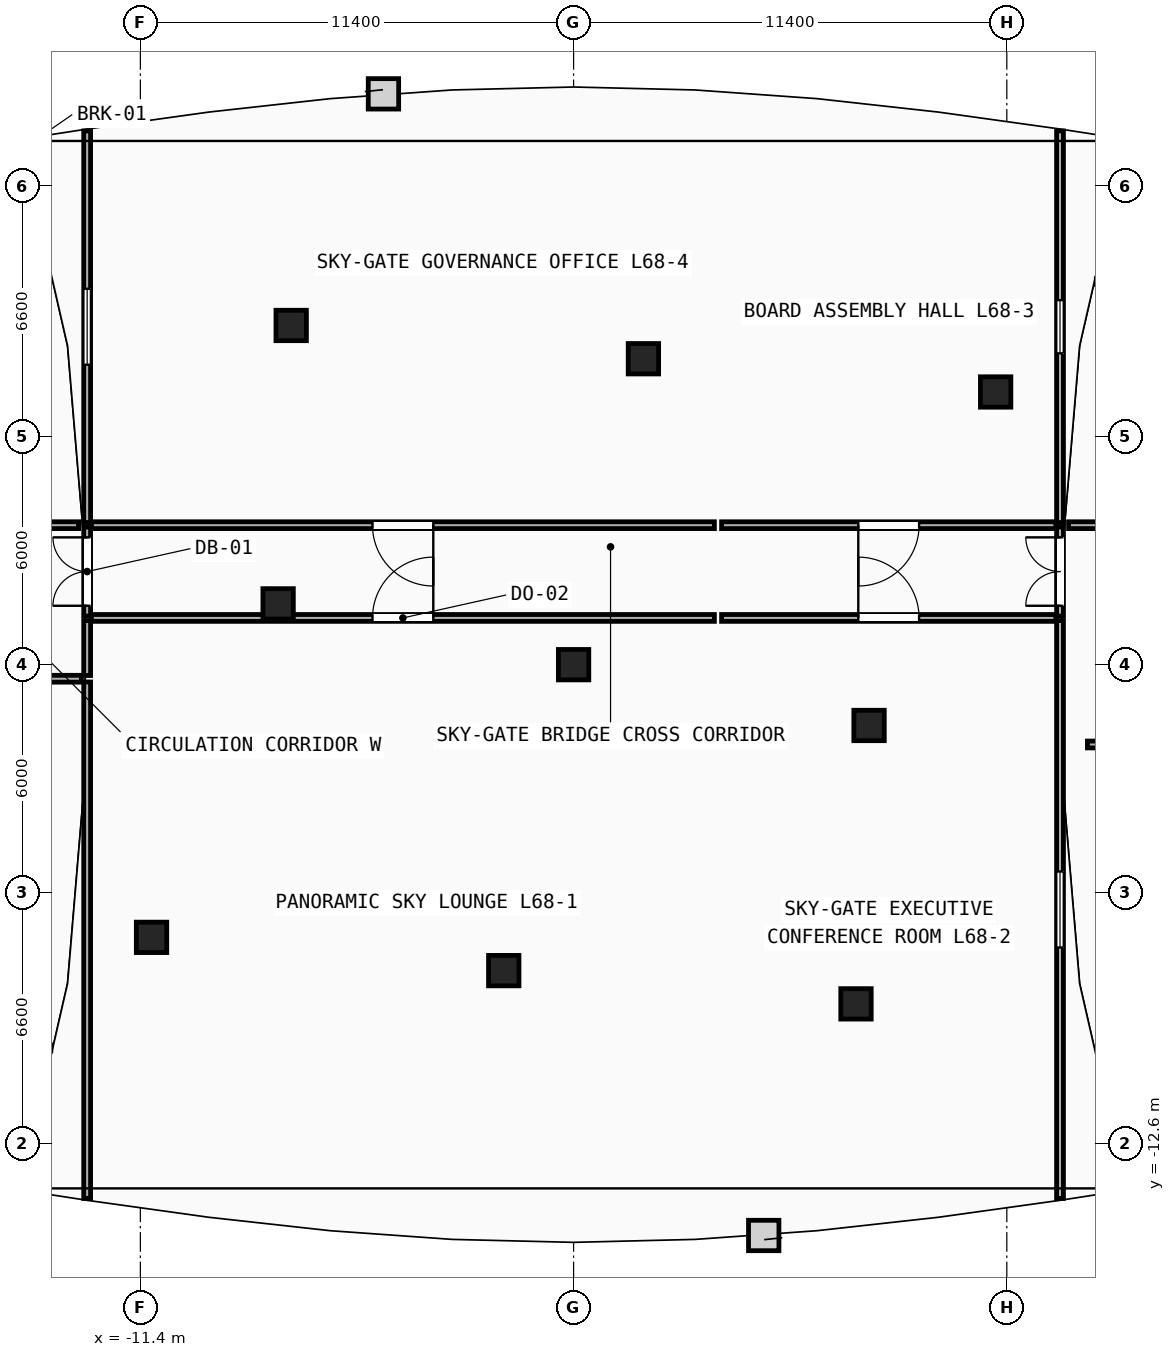
"""IFC4 building model, lengths in metres.
Left out: names, types, materials, properties, quantities, classifications, styles, units other than length and angle.
Written with IfcOpenShell. Run it as: python <this file> out.ifc"""

import sys

from ifc_helpers import new_model, si_unit, direction, frame, frame_2d, origin, origin_2d, place, context, subcontext, project, spatial, rectangle, extrude, element, fill, save


model = new_model("IFC4")
c1 = context("Model", 3, precision=1e-05, world=origin(), true_north=direction((0.0, 1.0)))
c2 = subcontext(c1, "Body", "Model", "MODEL_VIEW")
j1 = project(units=[si_unit("LENGTHUNIT", "METRE"), si_unit("PLANEANGLEUNIT", "RADIAN")], contexts=[c1])
p1 = place(None, origin())
s1 = spatial("IfcSite", under=j1, at=p1, CompositionType="ELEMENT")
p2 = place(p1, origin())
s2 = spatial("IfcBuilding", under=s1, at=p2, CompositionType="ELEMENT")
p3 = place(p2, frame((0.0, 0.0, 257.6)))
s3 = spatial("IfcBuildingStorey", under=s2, at=p3, CompositionType="ELEMENT", Elevation=257.6)
for number, where, z_axis, x_axis in (
    (1, (-11.106, -7.175, 0.0), (0.0, 0.0, 1.0), (1.0, 0.0, 0.0)),
    (2, (-1.837, -8.05, 0.0), (0.0, 0.0, 1.0), (1.0, 0.0, 0.0)),
    (3, (7.431, -8.925, 0.0), (0.0, 0.0, 1.0), (1.0, 0.0, 0.0)),
    (4, (-7.775, 1.6, 0.0), (0.0, 0.0, 1.0), (1.0, 0.0, 0.0)),
    (5, (0.0, 0.0, 0.0), (0.0, 0.0, 1.0), (1.0, 0.0, 0.0)),
    (6, (7.775, -1.6, 0.0), (0.0, 0.0, 1.0), (1.0, 0.0, 0.0)),
    (7, (-7.431, 8.925, 0.0), (0.0, 0.0, 1.0), (1.0, 0.0, 0.0)),
    (8, (1.837, 8.05, 0.0), (0.0, 0.0, 1.0), (1.0, 0.0, 0.0)),
    (9, (11.106, 7.175, 0.0), (0.0, 0.0, 1.0), (1.0, 0.0, 0.0)),
):
    element("IfcColumn", number, at=place(p3, frame(where, z_axis=z_axis, x_axis=x_axis)), inside=s3, PredefinedType="COLUMN", context=c2, shape_type="SweptSolid", body=[
        extrude(rectangle(XDim=0.8, YDim=0.8, at=origin_2d()), origin(), (0.0, 0.0, 1.0), 3.6),
    ])
p4 = place(p3, frame((-28.3, -0.37, 0.0), z_axis=(0.0, 0.0, 1.0), x_axis=(1.0, 0.0, 0.0)))
e10 = element("IfcWall", 10, at=p4, inside=s3, PredefinedType="PARTITIONING", context=c2, shape_type="SweptSolid", body=[
    extrude(rectangle(XDim=15.349, YDim=0.18, at=frame_2d((7.675, 0.0))), origin(), (0.0, 0.0, 1.0), 3.34),
])
p5 = place(p4, frame((7.175, 0.0, 0.0)))
e11 = element("IfcOpeningElement", 11, at=p5, cuts=e10, PredefinedType="OPENING", context=c2, shape_type="SweptSolid", body=[
    extrude(rectangle(XDim=1.0, YDim=2.15, at=frame_2d((0.5, 1.075))), frame((0.0, 0.1, 0.0), z_axis=(0.0, -1.0, 0.0), x_axis=(1.0, 0.0, 0.0)), (0.0, 0.0, 1.0), 0.2),
])
p6 = place(p3, frame((-13.026, 3.67, 0.0), z_axis=(0.0, 0.0, 1.0), x_axis=(-1.0, 0.0, 0.0)))
e12 = element("IfcWall", 12, at=p6, inside=s3, PredefinedType="PARTITIONING", context=c2, shape_type="SweptSolid", body=[
    extrude(rectangle(XDim=3.753, YDim=0.18, at=frame_2d((1.876, 0.0))), origin(), (0.0, 0.0, 1.0), 3.34),
])
p7 = place(p3, frame((13.521, -2.1, 0.0), z_axis=(0.0, 0.0, 1.0), x_axis=(1.0, 0.0, 0.0)))
e13 = element("IfcWall", 13, at=p7, inside=s3, PredefinedType="PARTITIONING", context=c2, shape_type="SweptSolid", body=[
    extrude(rectangle(XDim=7.398, YDim=0.18, at=frame_2d((3.699, 0.0))), origin(), (0.0, 0.0, 1.0), 3.34),
])
p8 = place(p3, frame((16.779, 3.67, 0.0), z_axis=(0.0, 0.0, 1.0), x_axis=(-1.0, 0.0, 0.0)))
e14 = element("IfcWall", 14, at=p8, inside=s3, PredefinedType="PARTITIONING", context=c2, shape_type="SweptSolid", body=[
    extrude(rectangle(XDim=3.753, YDim=0.18, at=frame_2d((1.876, 0.0))), origin(), (0.0, 0.0, 1.0), 3.34),
])
p9 = place(p3, frame((-12.688, 1.23, 0.0), z_axis=(0.0, 0.0, 1.0), x_axis=(1.0, 0.0, 0.0)))
e15 = element("IfcWall", 15, at=p9, inside=s3, PredefinedType="PARTITIONING", context=c2, shape_type="SweptSolid", body=[
    extrude(rectangle(XDim=16.394, YDim=0.18, at=frame_2d((8.197, 0.0))), origin(), (0.0, 0.0, 1.0), 2.663),
])
p10 = place(p9, frame((7.397, 0.0, 0.0)))
e16 = element("IfcOpeningElement", 16, at=p10, cuts=e15, PredefinedType="OPENING", context=c2, shape_type="SweptSolid", body=[
    extrude(rectangle(XDim=1.6, YDim=2.2, at=frame_2d((0.8, 1.1))), frame((0.0, 0.1, 0.0), z_axis=(0.0, -1.0, 0.0), x_axis=(1.0, 0.0, 0.0)), (0.0, 0.0, 1.0), 0.2),
])
p11 = place(p3, frame((3.895, 1.23, 0.0), z_axis=(0.0, 0.0, 1.0), x_axis=(1.0, 0.0, 0.0)))
e17 = element("IfcWall", 17, at=p11, inside=s3, PredefinedType="PARTITIONING", context=c2, shape_type="SweptSolid", body=[
    extrude(rectangle(XDim=8.793, YDim=0.18, at=frame_2d((4.397, 0.0))), origin(), (0.0, 0.0, 1.0), 3.34),
])
p12 = place(p11, frame((3.597, 0.0, 0.0)))
e18 = element("IfcOpeningElement", 18, at=p12, cuts=e17, PredefinedType="OPENING", context=c2, shape_type="SweptSolid", body=[
    extrude(rectangle(XDim=1.6, YDim=2.2, at=frame_2d((0.8, 1.1))), frame((0.0, 0.1, 0.0), z_axis=(0.0, -1.0, 0.0), x_axis=(1.0, 0.0, 0.0)), (0.0, 0.0, 1.0), 0.2),
])
p13 = place(p3, frame((12.688, 3.67, 0.0), z_axis=(0.0, 0.0, 1.0), x_axis=(-1.0, 0.0, 0.0)))
e19 = element("IfcWall", 19, at=p13, inside=s3, PredefinedType="PARTITIONING", context=c2, shape_type="SweptSolid", body=[
    extrude(rectangle(XDim=8.793, YDim=0.18, at=frame_2d((4.397, 0.0))), origin(), (0.0, 0.0, 1.0), 3.34),
])
p14 = place(p13, frame((3.597, 0.0, 0.0)))
e20 = element("IfcOpeningElement", 20, at=p14, cuts=e19, PredefinedType="OPENING", context=c2, shape_type="SweptSolid", body=[
    extrude(rectangle(XDim=1.6, YDim=2.2, at=frame_2d((0.8, 1.1))), frame((0.0, 0.1, 0.0), z_axis=(0.0, -1.0, 0.0), x_axis=(1.0, 0.0, 0.0)), (0.0, 0.0, 1.0), 0.2),
])
p15 = place(p3, frame((3.705, 3.67, 0.0), z_axis=(0.0, 0.0, 1.0), x_axis=(-1.0, 0.0, 0.0)))
e21 = element("IfcWall", 21, at=p15, inside=s3, PredefinedType="PARTITIONING", context=c2, shape_type="SweptSolid", body=[
    extrude(rectangle(XDim=16.394, YDim=0.18, at=frame_2d((8.197, 0.0))), origin(), (0.0, 0.0, 1.0), 3.34),
])
p16 = place(p15, frame((7.397, 0.0, 0.0)))
e22 = element("IfcOpeningElement", 22, at=p16, cuts=e21, PredefinedType="OPENING", context=c2, shape_type="SweptSolid", body=[
    extrude(rectangle(XDim=1.6, YDim=2.2, at=frame_2d((0.8, 1.1))), frame((0.0, 0.1, 0.0), z_axis=(0.0, -1.0, 0.0), x_axis=(1.0, 0.0, 0.0)), (0.0, 0.0, 1.0), 0.2),
])
p17 = place(p3, frame((-12.8, -14.044, 0.0), z_axis=(0.0, 0.0, 1.0), x_axis=(0.0, 1.0, 0.0)))
e23 = element("IfcWall", 23, at=p17, inside=s3, PredefinedType="PARTITIONING", context=c2, shape_type="SweptSolid", body=[
    extrude(rectangle(XDim=13.589, YDim=0.18, at=frame_2d((6.794, 0.0))), origin(), (0.0, 0.0, 1.0), 3.34),
])
p18 = place(p3, frame((-12.8, -0.285, 0.0), z_axis=(0.0, 0.0, 1.0), x_axis=(0.0, 1.0, 0.0)))
e24 = element("IfcWall", 24, at=p18, inside=s3, PredefinedType="PARTITIONING", context=c2, shape_type="SweptSolid", body=[
    extrude(rectangle(XDim=1.445, YDim=0.18, at=frame_2d((0.722, 0.0))), origin(), (0.0, 0.0, 1.0), 3.34),
])
p19 = place(p3, frame((-12.8, 3.74, 0.0), z_axis=(0.0, 0.0, 1.0), x_axis=(0.0, 1.0, 0.0)))
e25 = element("IfcWall", 25, at=p19, inside=s3, PredefinedType="PARTITIONING", context=c2, shape_type="SweptSolid", body=[
    extrude(rectangle(XDim=10.304, YDim=0.18, at=frame_2d((5.152, 0.0))), origin(), (0.0, 0.0, 1.0), 3.34),
])
p20 = place(p19, frame((4.152, 0.0, 1.05)))
e26 = element("IfcOpeningElement", 26, at=p20, cuts=e25, PredefinedType="OPENING", context=c2, shape_type="SweptSolid", body=[
    extrude(rectangle(XDim=2.0, YDim=1.5, at=frame_2d((1.0, 0.75))), frame((0.0, 0.1, 0.0), z_axis=(0.0, -1.0, 0.0), x_axis=(1.0, 0.0, 0.0)), (0.0, 0.0, 1.0), 0.2),
])
p21 = place(p3, frame((-12.8, 1.28, 0.0), z_axis=(0.0, 0.0, 1.0), x_axis=(0.0, 1.0, 0.0)))
e27 = element("IfcWall", 27, at=p21, inside=s3, PredefinedType="PARTITIONING", context=c2, shape_type="SweptSolid", body=[
    extrude(rectangle(XDim=2.34, YDim=0.18, at=frame_2d((1.17, 0.0))), origin(), (0.0, 0.0, 1.0), 3.34),
])
p22 = place(p21, frame((0.27, 0.0, 0.0)))
e28 = element("IfcOpeningElement", 28, at=p22, cuts=e27, PredefinedType="OPENING", context=c2, shape_type="SweptSolid", body=[
    extrude(rectangle(XDim=1.8, YDim=2.25, at=frame_2d((0.9, 1.125))), frame((0.0, 0.1, 0.0), z_axis=(0.0, -1.0, 0.0), x_axis=(1.0, 0.0, 0.0)), (0.0, 0.0, 1.0), 0.2),
])
p23 = place(p3, frame((12.8, -14.044, 0.0), z_axis=(0.0, 0.0, 1.0), x_axis=(0.0, 1.0, 0.0)))
e29 = element("IfcWall", 29, at=p23, inside=s3, PredefinedType="PARTITIONING", context=c2, shape_type="SweptSolid", body=[
    extrude(rectangle(XDim=15.204, YDim=0.18, at=frame_2d((7.602, 0.0))), origin(), (0.0, 0.0, 1.0), 3.34),
])
p24 = place(p23, frame((6.602, 0.0, 1.05)))
e30 = element("IfcOpeningElement", 30, at=p24, cuts=e29, PredefinedType="OPENING", context=c2, shape_type="SweptSolid", body=[
    extrude(rectangle(XDim=2.0, YDim=1.5, at=frame_2d((1.0, 0.75))), frame((0.0, 0.1, 0.0), z_axis=(0.0, -1.0, 0.0), x_axis=(1.0, 0.0, 0.0)), (0.0, 0.0, 1.0), 0.2),
])
p25 = place(p3, frame((12.8, 3.74, 0.0), z_axis=(0.0, 0.0, 1.0), x_axis=(0.0, 1.0, 0.0)))
e31 = element("IfcWall", 31, at=p25, inside=s3, PredefinedType="PARTITIONING", context=c2, shape_type="SweptSolid", body=[
    extrude(rectangle(XDim=10.304, YDim=0.18, at=frame_2d((5.152, 0.0))), origin(), (0.0, 0.0, 1.0), 3.34),
])
p26 = place(p25, frame((4.452, 0.0, 1.05)))
e32 = element("IfcOpeningElement", 32, at=p26, cuts=e31, PredefinedType="OPENING", context=c2, shape_type="SweptSolid", body=[
    extrude(rectangle(XDim=1.4, YDim=1.5, at=frame_2d((0.7, 0.75))), frame((0.0, 0.1, 0.0), z_axis=(0.0, -1.0, 0.0), x_axis=(1.0, 0.0, 0.0)), (0.0, 0.0, 1.0), 0.2),
])
p27 = place(p3, frame((12.8, 1.28, 0.0), z_axis=(0.0, 0.0, 1.0), x_axis=(0.0, 1.0, 0.0)))
e33 = element("IfcWall", 33, at=p27, inside=s3, PredefinedType="PARTITIONING", context=c2, shape_type="SweptSolid", body=[
    extrude(rectangle(XDim=2.34, YDim=0.18, at=frame_2d((1.17, 0.0))), origin(), (0.0, 0.0, 1.0), 3.34),
])
p28 = place(p27, frame((0.27, 0.0, 0.0)))
e34 = element("IfcOpeningElement", 34, at=p28, cuts=e33, PredefinedType="OPENING", context=c2, shape_type="SweptSolid", body=[
    extrude(rectangle(XDim=1.8, YDim=2.25, at=frame_2d((0.9, 1.125))), frame((0.0, 0.1, 0.0), z_axis=(0.0, -1.0, 0.0), x_axis=(1.0, 0.0, 0.0)), (0.0, 0.0, 1.0), 0.2),
])
p29 = place(p10, origin())
e35 = element("IfcDoor", 35, at=p29, inside=s3, OperationType="SINGLE_SWING_RIGHT", PredefinedType="DOOR", context=c2, shape_type="SweptSolid", body=[
    extrude(rectangle(XDim=1.6, YDim=2.2, at=frame_2d((0.8, 1.1))), frame((0.0, 0.025, 0.0), z_axis=(0.0, -1.0, 0.0), x_axis=(1.0, 0.0, 0.0)), (0.0, 0.0, 1.0), 0.05),
])
fill(e16, e35)
p30 = place(p16, origin())
e36 = element("IfcDoor", 36, at=p30, inside=s3, OperationType="SINGLE_SWING_LEFT", PredefinedType="DOOR", context=c2, shape_type="SweptSolid", body=[
    extrude(rectangle(XDim=1.6, YDim=2.2, at=frame_2d((0.8, 1.1))), frame((0.0, 0.025, 0.0), z_axis=(0.0, -1.0, 0.0), x_axis=(1.0, 0.0, 0.0)), (0.0, 0.0, 1.0), 0.05),
])
fill(e22, e36)
p31 = place(p12, origin())
e37 = element("IfcDoor", 37, at=p31, inside=s3, OperationType="SINGLE_SWING_LEFT", PredefinedType="DOOR", context=c2, shape_type="SweptSolid", body=[
    extrude(rectangle(XDim=1.6, YDim=2.2, at=frame_2d((0.8, 1.1))), frame((0.0, 0.025, 0.0), z_axis=(0.0, -1.0, 0.0), x_axis=(1.0, 0.0, 0.0)), (0.0, 0.0, 1.0), 0.05),
])
fill(e18, e37)
p32 = place(p14, origin())
e38 = element("IfcDoor", 38, at=p32, inside=s3, OperationType="SINGLE_SWING_RIGHT", PredefinedType="DOOR", context=c2, shape_type="SweptSolid", body=[
    extrude(rectangle(XDim=1.6, YDim=2.2, at=frame_2d((0.8, 1.1))), frame((0.0, 0.025, 0.0), z_axis=(0.0, -1.0, 0.0), x_axis=(1.0, 0.0, 0.0)), (0.0, 0.0, 1.0), 0.05),
])
fill(e20, e38)
p33 = place(p22, origin())
e39 = element("IfcDoor", 39, at=p33, inside=s3, OperationType="DOUBLE_DOOR_SINGLE_SWING", PredefinedType="DOOR", context=c2, shape_type="SweptSolid", body=[
    extrude(rectangle(XDim=1.8, YDim=2.25, at=frame_2d((0.9, 1.125))), frame((0.0, 0.025, 0.0), z_axis=(0.0, -1.0, 0.0), x_axis=(1.0, 0.0, 0.0)), (0.0, 0.0, 1.0), 0.05),
])
fill(e28, e39)
p34 = place(p28, origin())
e40 = element("IfcDoor", 40, at=p34, inside=s3, OperationType="DOUBLE_DOOR_SINGLE_SWING", PredefinedType="DOOR", context=c2, shape_type="SweptSolid", body=[
    extrude(rectangle(XDim=1.8, YDim=2.25, at=frame_2d((0.9, 1.125))), frame((0.0, 0.025, 0.0), z_axis=(0.0, -1.0, 0.0), x_axis=(1.0, 0.0, 0.0)), (0.0, 0.0, 1.0), 0.05),
])
fill(e34, e40)
p35 = place(p20, origin())
e41 = element("IfcWindow", 41, at=p35, inside=s3, PartitioningType="SINGLE_PANEL", PredefinedType="WINDOW", context=c2, shape_type="SweptSolid", body=[
    extrude(rectangle(XDim=2.0, YDim=1.5, at=frame_2d((1.0, 0.75))), frame((0.0, 0.03, 0.0), z_axis=(0.0, -1.0, 0.0), x_axis=(1.0, 0.0, 0.0)), (0.0, 0.0, 1.0), 0.06),
])
fill(e26, e41)
p36 = place(p24, origin())
e42 = element("IfcWindow", 42, at=p36, inside=s3, PartitioningType="SINGLE_PANEL", PredefinedType="WINDOW", context=c2, shape_type="SweptSolid", body=[
    extrude(rectangle(XDim=2.0, YDim=1.5, at=frame_2d((1.0, 0.75))), frame((0.0, 0.03, 0.0), z_axis=(0.0, -1.0, 0.0), x_axis=(1.0, 0.0, 0.0)), (0.0, 0.0, 1.0), 0.06),
])
fill(e30, e42)
p37 = place(p26, origin())
e43 = element("IfcWindow", 43, at=p37, inside=s3, PartitioningType="SINGLE_PANEL", PredefinedType="WINDOW", context=c2, shape_type="SweptSolid", body=[
    extrude(rectangle(XDim=1.4, YDim=1.5, at=frame_2d((0.7, 0.75))), frame((0.0, 0.03, 0.0), z_axis=(0.0, -1.0, 0.0), x_axis=(1.0, 0.0, 0.0)), (0.0, 0.0, 1.0), 0.06),
])
fill(e32, e43)
save(model, sys.argv[1])
